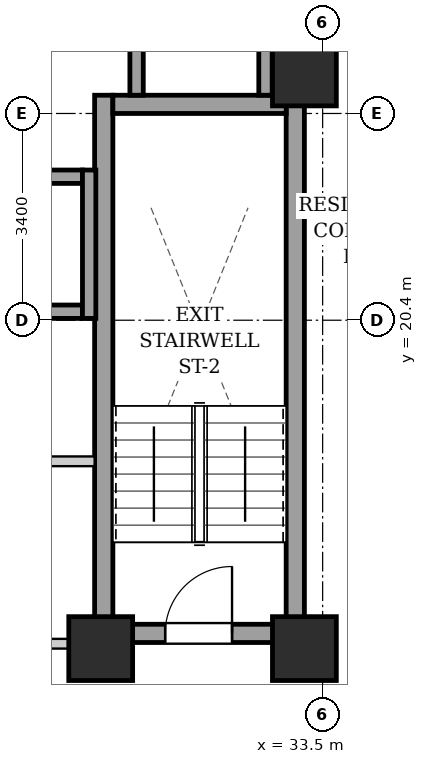
"""IFC4 building model, lengths in metres.
Left out: names, types, materials, properties, quantities, classifications, styles, units other than length and angle.
Written with IfcOpenShell. Run it as: python <this file> out.ifc"""

import sys

from ifc_helpers import new_model, si_unit, direction, frame, frame_2d, origin, origin_2d, place, context, subcontext, project, spatial, rectangle, extrude, element, fill, save


model = new_model("IFC4")
c1 = context("Model", 3, precision=1e-05, world=origin(), true_north=direction((0.0, 1.0)))
c2 = subcontext(c1, "Body", "Model", "MODEL_VIEW")
j1 = project(units=[si_unit("LENGTHUNIT", "METRE"), si_unit("PLANEANGLEUNIT", "RADIAN")], contexts=[c1])
p1 = place(None, origin())
s1 = spatial("IfcSite", under=j1, at=p1, CompositionType="ELEMENT")
p2 = place(p1, origin())
s2 = spatial("IfcBuilding", under=s1, at=p2, CompositionType="ELEMENT")
p3 = place(p2, frame((0.0, 0.0, 78.3)))
s3 = spatial("IfcBuildingStorey", under=s2, at=p3, CompositionType="ELEMENT", Elevation=78.3)
for number, where, z_axis, x_axis in (
    (1, (29.85, 15.0, 0.0), (0.0, 0.0, 1.0), (1.0, 0.0, 0.0)),
    (2, (33.2, 15.0, 0.0), (0.0, 0.0, 1.0), (1.0, 0.0, 0.0)),
    (3, (33.2, 24.45, 0.0), (0.0, 0.0, 1.0), (1.0, 0.0, 0.0)),
):
    element("IfcColumn", number, at=place(p3, frame(where, z_axis=z_axis, x_axis=x_axis)), inside=s3, PredefinedType="COLUMN", context=c2, shape_type="SweptSolid", body=[
        extrude(rectangle(XDim=1.05, YDim=1.05, at=origin_2d()), origin(), (0.0, 0.0, 1.0), 3.2),
    ])
for number, where, z_axis, x_axis in (
    (4, (29.9, 15.1, 0.0), (0.0, 0.0, 1.0), (0.0, 1.0, 0.0)),
    (5, (33.05, 15.1, 0.0), (0.0, 0.0, 1.0), (0.0, 1.0, 0.0)),
):
    element("IfcWall", number, at=place(p3, frame(where, z_axis=z_axis, x_axis=x_axis)), inside=s3, PredefinedType="SHEAR", context=c2, shape_type="SweptSolid", body=[
        extrude(rectangle(XDim=9.0, YDim=0.3, at=frame_2d((4.5, 0.0))), origin(), (0.0, 0.0, 1.0), 2.94),
    ])
p4 = place(p3, frame((30.05, 23.95, 0.0), z_axis=(0.0, 0.0, 1.0), x_axis=(1.0, 0.0, 0.0)))
e6 = element("IfcWall", 6, at=p4, inside=s3, PredefinedType="SHEAR", context=c2, shape_type="SweptSolid", body=[
    extrude(rectangle(XDim=2.85, YDim=0.3, at=frame_2d((1.425, 0.0))), origin(), (0.0, 0.0, 1.0), 2.94),
])
p5 = place(p3, frame((30.05, 15.25, 0.0), z_axis=(0.0, 0.0, 1.0), x_axis=(1.0, 0.0, 0.0)))
e7 = element("IfcWall", 7, at=p5, inside=s3, PredefinedType="SHEAR", context=c2, shape_type="SweptSolid", body=[
    extrude(rectangle(XDim=2.85, YDim=0.3, at=frame_2d((1.425, 0.0))), origin(), (0.0, 0.0, 1.0), 2.94),
])
p6 = place(p5, frame((0.86, 0.0, 0.0)))
e8 = element("IfcOpeningElement", 8, at=p6, cuts=e7, PredefinedType="OPENING", context=c2, shape_type="SweptSolid", body=[
    extrude(rectangle(XDim=1.1, YDim=2.05, at=frame_2d((0.55, 1.025))), frame((0.0, 0.16, 0.0), z_axis=(0.0, -1.0, 0.0), x_axis=(1.0, 0.0, 0.0)), (0.0, 0.0, 1.0), 0.32),
])
for number, where, z_axis, x_axis in (
    (9, (27.65, 20.54, 0.0), (0.0, 0.0, 1.0), (1.0, 0.0, 0.0)),
    (10, (27.65, 22.76, 0.0), (0.0, 0.0, 1.0), (1.0, 0.0, 0.0)),
):
    element("IfcWall", number, at=place(p3, frame(where, z_axis=z_axis, x_axis=x_axis)), inside=s3, PredefinedType="SHEAR", context=c2, shape_type="SweptSolid", body=[
        extrude(rectangle(XDim=1.9, YDim=0.22, at=frame_2d((0.95, 0.0))), origin(), (0.0, 0.0, 1.0), 2.94),
    ])
p7 = place(p3, frame((29.66, 20.43, 0.0), z_axis=(0.0, 0.0, 1.0), x_axis=(0.0, 1.0, 0.0)))
e11 = element("IfcWall", 11, at=p7, inside=s3, PredefinedType="SHEAR", context=c2, shape_type="SweptSolid", body=[
    extrude(rectangle(XDim=2.44, YDim=0.22, at=frame_2d((1.22, 0.0))), origin(), (0.0, 0.0, 1.0), 2.94),
])
for number, where, z_axis, x_axis in (
    (12, (30.44, 24.1, 0.0), (0.0, 0.0, 1.0), (0.0, 1.0, 0.0)),
    (13, (32.56, 24.1, 0.0), (0.0, 0.0, 1.0), (0.0, 1.0, 0.0)),
):
    element("IfcWall", number, at=place(p3, frame(where, z_axis=z_axis, x_axis=x_axis)), inside=s3, PredefinedType="SHEAR", context=c2, shape_type="SweptSolid", body=[
        extrude(rectangle(XDim=2.07, YDim=0.22, at=frame_2d((1.035, 0.0))), origin(), (0.0, 0.0, 1.0), 2.94),
    ])
p8 = place(p3, frame((21.25, 15.08, 0.0), z_axis=(0.0, 0.0, 1.0), x_axis=(1.0, 0.0, 0.0)))
e14 = element("IfcWall", 14, at=p8, inside=s3, PredefinedType="PARTITIONING", context=c2, shape_type="SweptSolid", body=[
    extrude(rectangle(XDim=8.5, YDim=0.16, at=frame_2d((4.25, 0.0))), origin(), (0.0, 0.0, 1.0), 2.309),
])
p9 = place(p8, frame((3.725, 0.0, 0.0)))
e15 = element("IfcOpeningElement", 15, at=p9, cuts=e14, PredefinedType="OPENING", context=c2, shape_type="SweptSolid", body=[
    extrude(rectangle(XDim=1.05, YDim=2.05, at=frame_2d((0.525, 1.025))), frame((0.0, 0.09, 0.0), z_axis=(0.0, -1.0, 0.0), x_axis=(1.0, 0.0, 0.0)), (0.0, 0.0, 1.0), 0.18),
])
p10 = place(p3, frame((28.65, 18.08, 0.0), z_axis=(0.0, 0.0, 1.0), x_axis=(1.0, 0.0, 0.0)))
e16 = element("IfcWall", 16, at=p10, inside=s3, PredefinedType="PARTITIONING", context=c2, shape_type="SweptSolid", body=[
    extrude(rectangle(XDim=1.1, YDim=0.16, at=frame_2d((0.55, 0.0))), origin(), (0.0, 0.0, 1.0), 2.94),
])
p11 = place(p3, frame((33.12, 24.12, 0.0), z_axis=(0.0, 0.0, 1.0), x_axis=(0.0, 1.0, 0.0)))
e17 = element("IfcWall", 17, at=p11, inside=s3, PredefinedType="PARTITIONING", context=c2, shape_type="SweptSolid", body=[
    extrude(rectangle(XDim=4.76, YDim=0.16, at=frame_2d((2.38, 0.0))), origin(), (0.0, 0.0, 1.0), 2.275),
])
p12 = place(p6, origin())
e18 = element("IfcDoor", 18, at=p12, inside=s3, OperationType="SINGLE_SWING_RIGHT", PredefinedType="DOOR", context=c2, shape_type="SweptSolid", body=[
    extrude(rectangle(XDim=1.1, YDim=2.05, at=frame_2d((0.55, 1.025))), frame((0.0, 0.025, 0.0), z_axis=(0.0, -1.0, 0.0), x_axis=(1.0, 0.0, 0.0)), (0.0, 0.0, 1.0), 0.05),
])
fill(e8, e18)
save(model, sys.argv[1])
